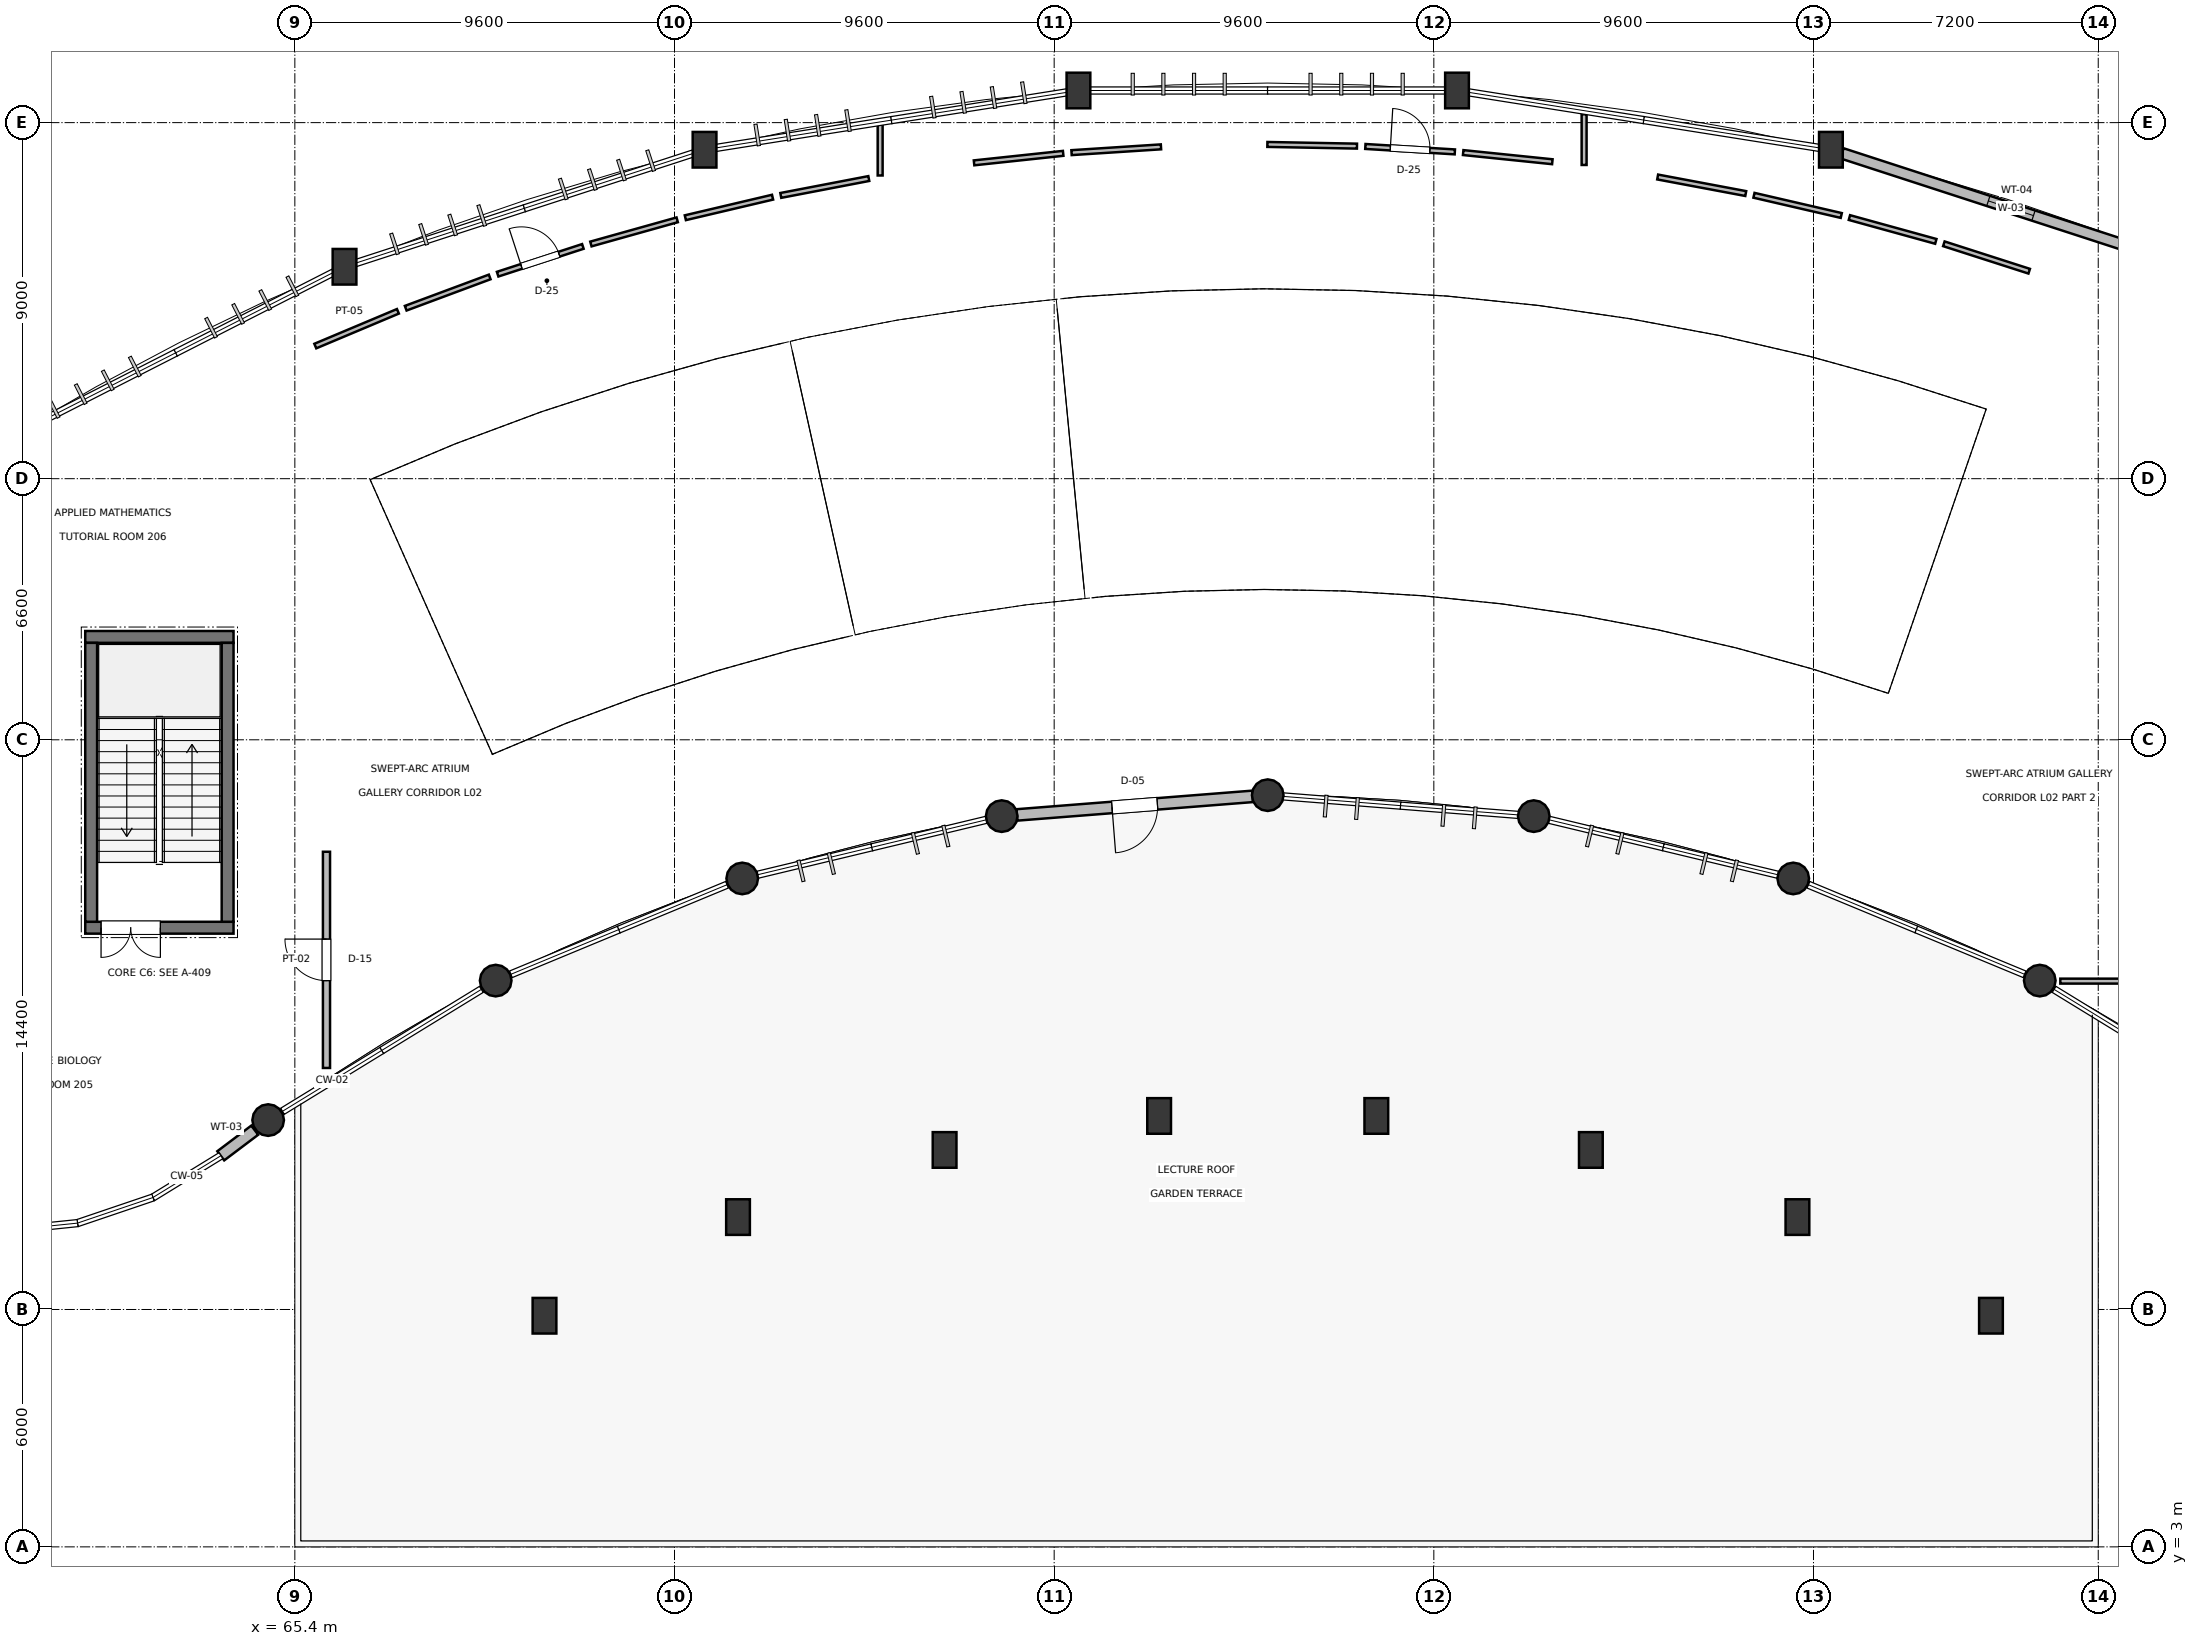
"""IFC4 building model, lengths in metres.
Left out: names, types, materials, properties, quantities, classifications, styles, units other than length and angle.
Written with IfcOpenShell. Run it as: python <this file> out.ifc"""

import sys

from ifc_helpers import new_model, si_unit, direction, frame, frame_2d, origin, origin_2d, place, context, subcontext, project, spatial, rectangle, circle, extrude, element, fill, save


model = new_model("IFC4")
c1 = context("Model", 3, precision=1e-05, world=origin(), true_north=direction((0.0, 1.0)))
c2 = subcontext(c1, "Body", "Model", "MODEL_VIEW")
j1 = project(units=[si_unit("LENGTHUNIT", "METRE"), si_unit("PLANEANGLEUNIT", "RADIAN")], contexts=[c1])
p1 = place(None, origin())
s1 = spatial("IfcSite", under=j1, at=p1, CompositionType="ELEMENT")
p2 = place(p1, origin())
s2 = spatial("IfcBuilding", under=s1, at=p2, CompositionType="ELEMENT")
p3 = place(p2, frame((0.0, 0.0, 10.2)))
s3 = spatial("IfcBuildingStorey", under=s2, at=p3, CompositionType="ELEMENT", Elevation=10.2)
for number, where, z_axis, x_axis in (
    (1, (71.713, 8.842, 0.0), (0.0, 0.0, 1.0), (1.0, 0.0, 0.0)),
    (2, (76.606, 11.336, 0.0), (0.0, 0.0, 1.0), (1.0, 0.0, 0.0)),
    (3, (66.656, 35.357, 0.0), (0.0, 0.0, 1.0), (1.0, 0.0, 0.0)),
    (4, (81.829, 13.033, 0.0), (0.0, 0.0, 1.0), (1.0, 0.0, 0.0)),
    (5, (75.76, 38.315, 0.0), (0.0, 0.0, 1.0), (1.0, 0.0, 0.0)),
    (6, (87.254, 13.892, 0.0), (0.0, 0.0, 1.0), (1.0, 0.0, 0.0)),
    (7, (85.214, 39.812, 0.0), (0.0, 0.0, 1.0), (1.0, 0.0, 0.0)),
    (8, (92.746, 13.892, 0.0), (0.0, 0.0, 1.0), (1.0, 0.0, 0.0)),
    (9, (94.786, 39.812, 0.0), (0.0, 0.0, 1.0), (1.0, 0.0, 0.0)),
    (10, (98.171, 13.033, 0.0), (0.0, 0.0, 1.0), (1.0, 0.0, 0.0)),
    (11, (104.24, 38.315, 0.0), (0.0, 0.0, 1.0), (1.0, 0.0, 0.0)),
    (12, (103.394, 11.336, 0.0), (0.0, 0.0, 1.0), (1.0, 0.0, 0.0)),
    (13, (108.287, 8.842, 0.0), (0.0, 0.0, 1.0), (1.0, 0.0, 0.0)),
):
    element("IfcColumn", number, at=place(p3, frame(where, z_axis=z_axis, x_axis=x_axis)), inside=s3, PredefinedType="COLUMN", context=c2, shape_type="SweptSolid", body=[
        extrude(rectangle(XDim=0.6, YDim=0.9, at=origin_2d()), origin(), (0.0, 0.0, 1.0), 4.8),
    ])
for number, where, z_axis, x_axis in (
    (14, (64.725, 13.788, 0.0), (0.0, 0.0, 1.0), (1.0, 0.0, 0.0)),
    (15, (70.479, 17.313, 0.0), (0.0, 0.0, 1.0), (1.0, 0.0, 0.0)),
    (16, (76.712, 19.896, 0.0), (0.0, 0.0, 1.0), (1.0, 0.0, 0.0)),
    (17, (83.273, 21.471, 0.0), (0.0, 0.0, 1.0), (1.0, 0.0, 0.0)),
    (18, (90.0, 22.0, 0.0), (0.0, 0.0, 1.0), (1.0, 0.0, 0.0)),
    (19, (96.727, 21.471, 0.0), (0.0, 0.0, 1.0), (1.0, 0.0, 0.0)),
    (20, (103.288, 19.896, 0.0), (0.0, 0.0, 1.0), (1.0, 0.0, 0.0)),
    (21, (109.521, 17.313, 0.0), (0.0, 0.0, 1.0), (1.0, 0.0, 0.0)),
):
    element("IfcColumn", number, at=place(p3, frame(where, z_axis=z_axis, x_axis=x_axis)), inside=s3, PredefinedType="COLUMN", context=c2, shape_type="SweptSolid", body=[
        extrude(circle(Radius=0.4, at=origin_2d()), origin(), (0.0, 0.0, 1.0), 4.8),
    ])
p4 = place(p3, frame((63.527, 12.885, 0.0), z_axis=(0.0, 0.0, 1.0), x_axis=(0.798608971494, 0.601850239387, 0.0)))
e22 = element("IfcWall", 22, at=p4, inside=s3, PredefinedType="SOLIDWALL", context=c2, shape_type="SweptSolid", body=[
    extrude(rectangle(XDim=1.076, YDim=0.29, at=frame_2d((0.538, 0.0))), origin(), (0.0, 0.0, 1.0), 4.55),
])
p5 = place(p3, frame((83.657, 21.501, 0.0), z_axis=(0.0, 0.0, 1.0), x_axis=(0.996917429448, 0.078457879551, 0.0)))
e23 = element("IfcWall", 23, at=p5, inside=s3, PredefinedType="SOLIDWALL", context=c2, shape_type="SweptSolid", body=[
    extrude(rectangle(XDim=5.978, YDim=0.29, at=frame_2d((2.989, 0.0))), origin(), (0.0, 0.0, 1.0), 3.755),
])
p6 = place(p5, frame((2.414, 0.0, 0.0)))
e24 = element("IfcOpeningElement", 24, at=p6, cuts=e23, PredefinedType="OPENING", context=c2, shape_type="SweptSolid", body=[
    extrude(rectangle(XDim=1.15, YDim=2.2, at=frame_2d((0.575, 1.1))), frame((0.0, 0.155, 0.0), z_axis=(0.0, -1.0, 0.0), x_axis=(1.0, 0.0, 0.0)), (0.0, 0.0, 1.0), 0.31),
])
p7 = place(p3, frame((104.521, 38.223, 0.0), z_axis=(0.0, 0.0, 1.0), x_axis=(0.951056038367, -0.309018465281, 0.0)))
e25 = element("IfcWall", 25, at=p7, inside=s3, PredefinedType="SOLIDWALL", context=c2, shape_type="SweptSolid", body=[
    extrude(rectangle(XDim=8.982, YDim=0.27, at=frame_2d((4.491, 0.0))), origin(), (0.0, 0.0, 1.0), 3.705),
])
p8 = place(p7, frame((3.891, 0.0, 0.9)))
e26 = element("IfcOpeningElement", 26, at=p8, cuts=e25, PredefinedType="OPENING", context=c2, shape_type="SweptSolid", body=[
    extrude(rectangle(XDim=1.2, YDim=1.95, at=frame_2d((0.6, 0.975))), frame((0.0, 0.145, 0.0), z_axis=(0.0, -1.0, 0.0), x_axis=(1.0, 0.0, 0.0)), (0.0, 0.0, 1.0), 0.29),
])
p9 = place(p3, frame((60.1, 18.65, 0.0), z_axis=(0.0, 0.0, 1.0), x_axis=(1.0, 0.0, 0.0)))
e27 = element("IfcWall", 27, at=p9, inside=s3, PredefinedType="SHEAR", context=c2, shape_type="SweptSolid", body=[
    extrude(rectangle(XDim=3.75, YDim=0.3, at=frame_2d((1.875, 0.0))), origin(), (0.0, 0.0, 1.0), 4.58),
])
p10 = place(p9, frame((0.4, 0.0, 0.0)))
e28 = element("IfcOpeningElement", 28, at=p10, cuts=e27, PredefinedType="OPENING", context=c2, shape_type="SweptSolid", body=[
    extrude(rectangle(XDim=1.5, YDim=2.2, at=frame_2d((0.75, 1.1))), frame((0.0, 0.16, 0.0), z_axis=(0.0, -1.0, 0.0), x_axis=(1.0, 0.0, 0.0)), (0.0, 0.0, 1.0), 0.32),
])
p11 = place(p3, frame((60.1, 26.0, 0.0), z_axis=(0.0, 0.0, 1.0), x_axis=(1.0, 0.0, 0.0)))
e29 = element("IfcWall", 29, at=p11, inside=s3, PredefinedType="SHEAR", context=c2, shape_type="SweptSolid", body=[
    extrude(rectangle(XDim=3.75, YDim=0.3, at=frame_2d((1.875, 0.0))), origin(), (0.0, 0.0, 1.0), 4.58),
])
for number, where, z_axis, x_axis in (
    (30, (60.25, 18.8, 0.0), (0.0, 0.0, 1.0), (0.0, 1.0, 0.0)),
    (31, (63.7, 18.8, 0.0), (0.0, 0.0, 1.0), (0.0, 1.0, 0.0)),
):
    element("IfcWall", number, at=place(p3, frame(where, z_axis=z_axis, x_axis=x_axis)), inside=s3, PredefinedType="SHEAR", context=c2, shape_type="SweptSolid", body=[
        extrude(rectangle(XDim=7.05, YDim=0.3, at=frame_2d((3.525, 0.0))), origin(), (0.0, 0.0, 1.0), 4.58),
    ])
for number, where, z_axis, x_axis in (
    (32, (65.917, 33.352, 0.0), (0.0, 0.0, 1.0), (0.922, 0.388, 0.0)),
    (33, (68.203, 34.309, 0.0), (0.0, 0.0, 1.0), (0.937, 0.349, 0.0)),
):
    element("IfcWall", number, at=place(p3, frame(where, z_axis=z_axis, x_axis=x_axis)), inside=s3, PredefinedType="PARTITIONING", context=c2, shape_type="SweptSolid", body=[
        extrude(rectangle(XDim=2.266, YDim=0.125, at=frame_2d((1.133, 0.0))), origin(), (0.0, 0.0, 1.0), 3.705),
    ])
p12 = place(p3, frame((70.528, 35.169, 0.0), z_axis=(0.0, 0.0, 1.0), x_axis=(0.950910506912, 0.309466004345, 0.0)))
e34 = element("IfcWall", 34, at=p12, inside=s3, PredefinedType="PARTITIONING", context=c2, shape_type="SweptSolid", body=[
    extrude(rectangle(XDim=2.267, YDim=0.125, at=frame_2d((1.133, 0.0))), origin(), (0.0, 0.0, 1.0), 3.705),
])
p13 = place(p12, frame((0.633, 0.0, 0.0)))
e35 = element("IfcOpeningElement", 35, at=p13, cuts=e34, PredefinedType="OPENING", context=c2, shape_type="SweptSolid", body=[
    extrude(rectangle(XDim=1.0, YDim=2.15, at=frame_2d((0.5, 1.075))), frame((0.0, 0.073, 0.0), z_axis=(0.0, -1.0, 0.0), x_axis=(1.0, 0.0, 0.0)), (0.0, 0.0, 1.0), 0.145),
])
for number, where, z_axis, x_axis in (
    (36, (72.886, 35.932, 0.0), (0.0, 0.0, 1.0), (0.963, 0.27, 0.0)),
    (37, (75.274, 36.596, 0.0), (0.0, 0.0, 1.0), (0.973, 0.229, 0.0)),
):
    element("IfcWall", number, at=place(p3, frame(where, z_axis=z_axis, x_axis=x_axis)), inside=s3, PredefinedType="PARTITIONING", context=c2, shape_type="SweptSolid", body=[
        extrude(rectangle(XDim=2.266, YDim=0.125, at=frame_2d((1.133, 0.0))), origin(), (0.0, 0.0, 1.0), 3.705),
    ])
p14 = place(p3, frame((77.688, 37.16, 0.0), z_axis=(0.0, 0.0, 1.0), x_axis=(0.982087808033, 0.188423823634, 0.0)))
e38 = element("IfcWall", 38, at=p14, inside=s3, PredefinedType="PARTITIONING", context=c2, shape_type="SweptSolid", body=[
    extrude(rectangle(XDim=2.266, YDim=0.125, at=frame_2d((1.133, 0.0))), origin(), (0.0, 0.0, 1.0), 4.48),
])
p15 = place(p3, frame((82.574, 37.983, 0.0), z_axis=(0.0, 0.0, 1.0), x_axis=(0.994366469197, 0.105996815696, 0.0)))
e39 = element("IfcWall", 39, at=p15, inside=s3, PredefinedType="PARTITIONING", context=c2, shape_type="SweptSolid", body=[
    extrude(rectangle(XDim=2.266, YDim=0.125, at=frame_2d((1.133, 0.0))), origin(), (0.0, 0.0, 1.0), 3.705),
])
p16 = place(p3, frame((85.039, 38.241, 0.0), z_axis=(0.0, 0.0, 1.0), x_axis=(0.997915696942, 0.064531091706, 0.0)))
e40 = element("IfcWall", 40, at=p16, inside=s3, PredefinedType="PARTITIONING", context=c2, shape_type="SweptSolid", body=[
    extrude(rectangle(XDim=2.266, YDim=0.125, at=frame_2d((1.133, 0.0))), origin(), (0.0, 0.0, 1.0), 3.705),
])
p17 = place(p3, frame((89.991, 38.448, 0.0), z_axis=(0.0, 0.0, 1.0), x_axis=(0.999822278173, -0.018852375679, 0.0)))
e41 = element("IfcWall", 41, at=p17, inside=s3, PredefinedType="PARTITIONING", context=c2, shape_type="SweptSolid", body=[
    extrude(rectangle(XDim=2.266, YDim=0.125, at=frame_2d((1.133, 0.0))), origin(), (0.0, 0.0, 1.0), 4.48),
])
p18 = place(p3, frame((92.469, 38.397, 0.0), z_axis=(0.0, 0.0, 1.0), x_axis=(0.998159220571, -0.060647921561, 0.0)))
e42 = element("IfcWall", 42, at=p18, inside=s3, PredefinedType="PARTITIONING", context=c2, shape_type="SweptSolid", body=[
    extrude(rectangle(XDim=2.266, YDim=0.125, at=frame_2d((1.133, 0.0))), origin(), (0.0, 0.0, 1.0), 3.705),
])
p19 = place(p18, frame((0.633, 0.0, 0.0)))
e43 = element("IfcOpeningElement", 43, at=p19, cuts=e42, PredefinedType="OPENING", context=c2, shape_type="SweptSolid", body=[
    extrude(rectangle(XDim=1.0, YDim=2.15, at=frame_2d((0.5, 1.075))), frame((0.0, 0.073, 0.0), z_axis=(0.0, -1.0, 0.0), x_axis=(1.0, 0.0, 0.0)), (0.0, 0.0, 1.0), 0.145),
])
p20 = place(p3, frame((94.942, 38.243, 0.0), z_axis=(0.0, 0.0, 1.0), x_axis=(0.994772464136, -0.102116328749, 0.0)))
e44 = element("IfcWall", 44, at=p20, inside=s3, PredefinedType="PARTITIONING", context=c2, shape_type="SweptSolid", body=[
    extrude(rectangle(XDim=2.267, YDim=0.125, at=frame_2d((1.133, 0.0))), origin(), (0.0, 0.0, 1.0), 3.705),
])
p21 = place(p3, frame((99.86, 37.625, 0.0), z_axis=(0.0, 0.0, 1.0), x_axis=(0.982805045735, -0.184646262018, 0.0)))
e45 = element("IfcWall", 45, at=p21, inside=s3, PredefinedType="PARTITIONING", context=c2, shape_type="SweptSolid", body=[
    extrude(rectangle(XDim=2.266, YDim=0.125, at=frame_2d((1.133, 0.0))), origin(), (0.0, 0.0, 1.0), 4.48),
])
p22 = place(p3, frame((102.295, 37.163, 0.0), z_axis=(0.0, 0.0, 1.0), x_axis=(0.974269394544, -0.225386660775, 0.0)))
e46 = element("IfcWall", 46, at=p22, inside=s3, PredefinedType="PARTITIONING", context=c2, shape_type="SweptSolid", body=[
    extrude(rectangle(XDim=2.266, YDim=0.125, at=frame_2d((1.133, 0.0))), origin(), (0.0, 0.0, 1.0), 3.705),
])
for number, where, z_axis, x_axis in (
    (47, (104.708, 36.6, 0.0), (0.0, 0.0, 1.0), (0.964, -0.266, 0.0)),
    (48, (107.097, 35.937, 0.0), (0.0, 0.0, 1.0), (0.952, -0.306, 0.0)),
):
    element("IfcWall", number, at=place(p3, frame(where, z_axis=z_axis, x_axis=x_axis)), inside=s3, PredefinedType="PARTITIONING", context=c2, shape_type="SweptSolid", body=[
        extrude(rectangle(XDim=2.266, YDim=0.125, at=frame_2d((1.133, 0.0))), origin(), (0.0, 0.0, 1.0), 3.705),
    ])
p23 = place(p3, frame((110.041, 17.3, 0.0), z_axis=(0.0, 0.0, 1.0), x_axis=(1.0, 0.0, 0.0)))
e49 = element("IfcWall", 49, at=p23, inside=s3, PredefinedType="PARTITIONING", context=c2, shape_type="SweptSolid", body=[
    extrude(rectangle(XDim=3.779, YDim=0.125, at=frame_2d((1.89, 0.0))), origin(), (0.0, 0.0, 1.0), 3.705),
])
p24 = place(p3, frame((66.2, 15.105, 0.0), z_axis=(0.0, 0.0, 1.0), x_axis=(0.0, 1.0, 0.0)))
e50 = element("IfcWall", 50, at=p24, inside=s3, PredefinedType="PARTITIONING", context=c2, shape_type="SweptSolid", body=[
    extrude(rectangle(XDim=5.465, YDim=0.18, at=frame_2d((2.733, 0.0))), origin(), (0.0, 0.0, 1.0), 3.705),
])
p25 = place(p24, frame((2.208, 0.0, 0.0)))
e51 = element("IfcOpeningElement", 51, at=p25, cuts=e50, PredefinedType="OPENING", context=c2, shape_type="SweptSolid", body=[
    extrude(rectangle(XDim=1.05, YDim=2.2, at=frame_2d((0.525, 1.1))), frame((0.0, 0.1, 0.0), z_axis=(0.0, -1.0, 0.0), x_axis=(1.0, 0.0, 0.0)), (0.0, 0.0, 1.0), 0.2),
])
p26 = place(p3, frame((80.2, 37.664, 0.0), z_axis=(0.0, 0.0, 1.0), x_axis=(0.0, 1.0, 0.0)))
e52 = element("IfcWall", 52, at=p26, inside=s3, PredefinedType="PARTITIONING", context=c2, shape_type="SweptSolid", body=[
    extrude(rectangle(XDim=1.285, YDim=0.125, at=frame_2d((0.643, 0.0))), origin(), (0.0, 0.0, 1.0), 3.705),
])
p27 = place(p3, frame((98.0, 37.929, 0.0), z_axis=(0.0, 0.0, 1.0), x_axis=(0.0, 1.0, 0.0)))
e53 = element("IfcWall", 53, at=p27, inside=s3, PredefinedType="PARTITIONING", context=c2, shape_type="SweptSolid", body=[
    extrude(rectangle(XDim=1.281, YDim=0.125, at=frame_2d((0.64, 0.0))), origin(), (0.0, 0.0, 1.0), 3.705),
])
p28 = place(p6, frame((1.15, 0.0, 0.0), z_axis=(0.0, 0.0, 1.0), x_axis=(-1.0, 0.0, 0.0)))
e54 = element("IfcDoor", 54, at=p28, inside=s3, OperationType="SINGLE_SWING_LEFT", PredefinedType="DOOR", context=c2, shape_type="SweptSolid", body=[
    extrude(rectangle(XDim=1.15, YDim=2.2, at=frame_2d((0.575, 1.1))), frame((0.0, 0.025, 0.0), z_axis=(0.0, -1.0, 0.0), x_axis=(1.0, 0.0, 0.0)), (0.0, 0.0, 1.0), 0.05),
])
fill(e24, e54)
p29 = place(p8, origin())
e55 = element("IfcWindow", 55, at=p29, inside=s3, PartitioningType="DOUBLE_PANEL_HORIZONTAL", PredefinedType="WINDOW", context=c2, shape_type="SweptSolid", body=[
    extrude(rectangle(XDim=1.2, YDim=1.95, at=frame_2d((0.6, 0.975))), frame((0.0, 0.03, 0.0), z_axis=(0.0, -1.0, 0.0), x_axis=(1.0, 0.0, 0.0)), (0.0, 0.0, 1.0), 0.06),
])
fill(e26, e55)
p30 = place(p10, frame((1.5, 0.0, 0.0), z_axis=(0.0, 0.0, 1.0), x_axis=(-1.0, 0.0, 0.0)))
e56 = element("IfcDoor", 56, at=p30, inside=s3, OperationType="DOUBLE_DOOR_SINGLE_SWING", PredefinedType="DOOR", context=c2, shape_type="SweptSolid", body=[
    extrude(rectangle(XDim=1.5, YDim=2.2, at=frame_2d((0.75, 1.1))), frame((0.0, 0.025, 0.0), z_axis=(0.0, -1.0, 0.0), x_axis=(1.0, 0.0, 0.0)), (0.0, 0.0, 1.0), 0.05),
])
fill(e28, e56)
p31 = place(p13, origin())
e57 = element("IfcDoor", 57, at=p31, inside=s3, OperationType="SINGLE_SWING_LEFT", PredefinedType="DOOR", context=c2, shape_type="SweptSolid", body=[
    extrude(rectangle(XDim=1.0, YDim=2.15, at=frame_2d((0.5, 1.075))), frame((0.0, 0.025, 0.0), z_axis=(0.0, -1.0, 0.0), x_axis=(1.0, 0.0, 0.0)), (0.0, 0.0, 1.0), 0.05),
])
fill(e35, e57)
p32 = place(p25, origin())
e58 = element("IfcDoor", 58, at=p32, inside=s3, OperationType="SINGLE_SWING_RIGHT", PredefinedType="DOOR", context=c2, shape_type="SweptSolid", body=[
    extrude(rectangle(XDim=1.05, YDim=2.2, at=frame_2d((0.525, 1.1))), frame((0.0, 0.025, 0.0), z_axis=(0.0, -1.0, 0.0), x_axis=(1.0, 0.0, 0.0)), (0.0, 0.0, 1.0), 0.05),
])
fill(e51, e58)
p33 = place(p19, origin())
e59 = element("IfcDoor", 59, at=p33, inside=s3, OperationType="SINGLE_SWING_LEFT", PredefinedType="DOOR", context=c2, shape_type="SweptSolid", body=[
    extrude(rectangle(XDim=1.0, YDim=2.15, at=frame_2d((0.5, 1.075))), frame((0.0, 0.025, 0.0), z_axis=(0.0, -1.0, 0.0), x_axis=(1.0, 0.0, 0.0)), (0.0, 0.0, 1.0), 0.05),
])
fill(e43, e59)
save(model, sys.argv[1])
